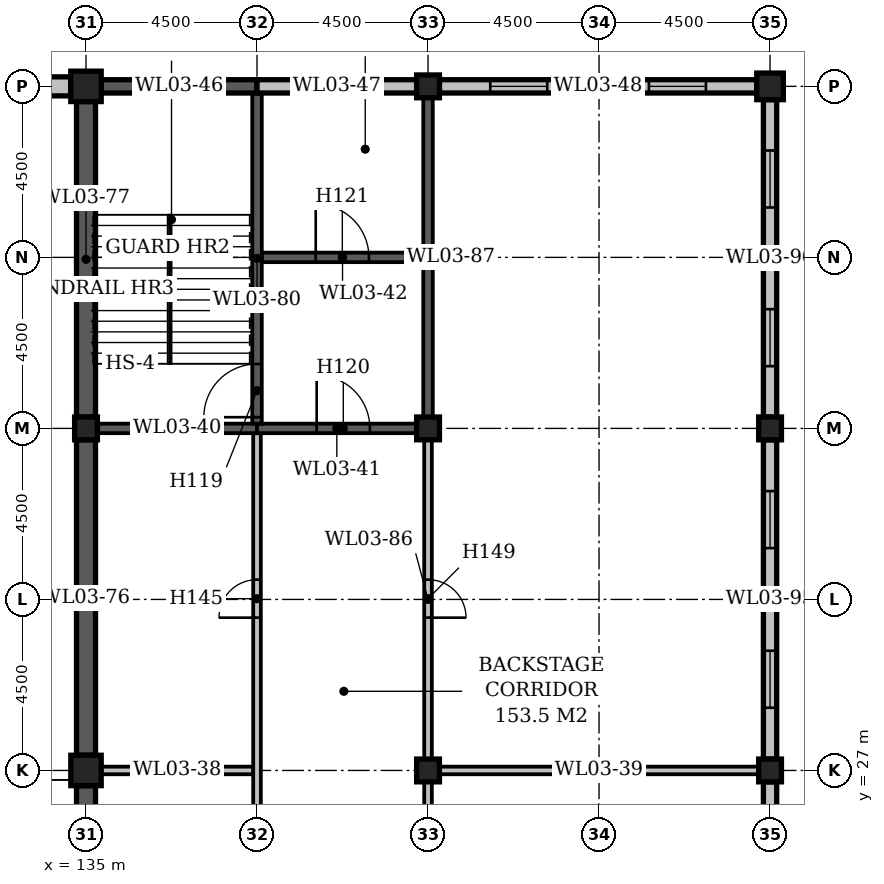
"""IFC4 building model, lengths in metres.
Left out: names, types, materials, properties, quantities, classifications, styles, units other than length and angle.
Written with IfcOpenShell. Run it as: python <this file> out.ifc"""

import sys

from ifc_helpers import new_model, si_unit, direction, frame, frame_2d, origin, origin_2d, place, context, subcontext, project, spatial, rectangle, extrude, element, fill, save


model = new_model("IFC4")
c1 = context("Model", 3, precision=1e-05, world=origin(), true_north=direction((0.0, 1.0)))
c2 = subcontext(c1, "Body", "Model", "MODEL_VIEW")
j1 = project(units=[si_unit("LENGTHUNIT", "METRE"), si_unit("PLANEANGLEUNIT", "RADIAN")], contexts=[c1])
p1 = place(None, origin())
s1 = spatial("IfcSite", under=j1, at=p1, CompositionType="ELEMENT")
p2 = place(p1, origin())
s2 = spatial("IfcBuilding", under=s1, at=p2, CompositionType="ELEMENT")
p3 = place(p2, frame((0.0, 0.0, 19.0)))
s3 = spatial("IfcBuildingStorey", under=s2, at=p3, CompositionType="ELEMENT", Elevation=19.0)
p4 = place(p3, frame((135.0, 27.0, -0.3), z_axis=(0.0, 0.0, 1.0), x_axis=(1.0, 0.0, 0.0)))
e1 = element("IfcColumn", 1, at=p4, inside=s3, PredefinedType="COLUMN", context=c2, shape_type="SweptSolid", body=[
    extrude(rectangle(XDim=0.8, YDim=0.8, at=origin_2d()), origin(), (0.0, 0.0, 1.0), 5.0),
])
p5 = place(p3, frame((135.0, 36.0, -0.3), z_axis=(0.0, 0.0, 1.0), x_axis=(1.0, 0.0, 0.0)))
e2 = element("IfcColumn", 2, at=p5, inside=s3, PredefinedType="COLUMN", context=c2, shape_type="SweptSolid", body=[
    extrude(rectangle(XDim=0.6, YDim=0.6, at=origin_2d()), origin(), (0.0, 0.0, 1.0), 5.0),
])
p6 = place(p3, frame((135.0, 45.0, -0.3), z_axis=(0.0, 0.0, 1.0), x_axis=(1.0, 0.0, 0.0)))
e3 = element("IfcColumn", 3, at=p6, inside=s3, PredefinedType="COLUMN", context=c2, shape_type="SweptSolid", body=[
    extrude(rectangle(XDim=0.8, YDim=0.8, at=origin_2d()), origin(), (0.0, 0.0, 1.0), 5.0),
])
for number, where, z_axis, x_axis in (
    (4, (144.0, 27.0, 0.0), (0.0, 0.0, 1.0), (1.0, 0.0, 0.0)),
    (5, (144.0, 36.0, 0.0), (0.0, 0.0, 1.0), (1.0, 0.0, 0.0)),
    (6, (144.0, 45.0, 0.0), (0.0, 0.0, 1.0), (1.0, 0.0, 0.0)),
    (7, (153.0, 27.0, 0.0), (0.0, 0.0, 1.0), (1.0, 0.0, 0.0)),
    (8, (153.0, 36.0, 0.0), (0.0, 0.0, 1.0), (1.0, 0.0, 0.0)),
):
    element("IfcColumn", number, at=place(p3, frame(where, z_axis=z_axis, x_axis=x_axis)), inside=s3, PredefinedType="COLUMN", context=c2, shape_type="SweptSolid", body=[
        extrude(rectangle(XDim=0.6, YDim=0.6, at=origin_2d()), origin(), (0.0, 0.0, 1.0), 4.7),
    ])
p7 = place(p3, frame((153.0, 45.0, 0.0), z_axis=(0.0, 0.0, 1.0), x_axis=(1.0, 0.0, 0.0)))
e9 = element("IfcColumn", 9, at=p7, inside=s3, PredefinedType="COLUMN", context=c2, shape_type="SweptSolid", body=[
    extrude(rectangle(XDim=0.7, YDim=0.7, at=origin_2d()), origin(), (0.0, 0.0, 1.0), 4.7),
])
p8 = place(p3, frame((135.4, 27.0, 0.0), z_axis=(0.0, 0.0, 1.0), x_axis=(1.0, 0.0, 0.0)))
e10 = element("IfcWall", 10, at=p8, inside=s3, PredefinedType="STANDARD", context=c2, shape_type="SweptSolid", body=[
    extrude(rectangle(XDim=4.0, YDim=0.2, at=frame_2d((2.0, 0.0))), origin(), (0.0, 0.0, 1.0), 4.7),
])
p9 = place(p3, frame((144.3, 27.0, 0.0), z_axis=(0.0, 0.0, 1.0), x_axis=(1.0, 0.0, 0.0)))
e11 = element("IfcWall", 11, at=p9, inside=s3, PredefinedType="STANDARD", context=c2, shape_type="SweptSolid", body=[
    extrude(rectangle(XDim=8.4, YDim=0.2, at=frame_2d((4.2, 0.0))), origin(), (0.0, 0.0, 1.0), 4.7),
])
p10 = place(p3, frame((135.3, 36.0, 0.0), z_axis=(0.0, 0.0, 1.0), x_axis=(1.0, 0.0, 0.0)))
e12 = element("IfcWall", 12, at=p10, inside=s3, PredefinedType="STANDARD", context=c2, shape_type="SweptSolid", body=[
    extrude(rectangle(XDim=4.2, YDim=0.25, at=frame_2d((2.1, 0.0))), origin(), (0.0, 0.0, 1.0), 5.0),
])
p11 = place(p3, frame((139.5, 36.0, 0.0), z_axis=(0.0, 0.0, 1.0), x_axis=(1.0, 0.0, 0.0)))
e13 = element("IfcWall", 13, at=p11, inside=s3, PredefinedType="STANDARD", context=c2, shape_type="SweptSolid", body=[
    extrude(rectangle(XDim=4.2, YDim=0.25, at=frame_2d((2.1, 0.0))), origin(), (0.0, 0.0, 1.0), 4.7),
])
p12 = place(p11, frame((1.57, 0.0, 0.0)))
e14 = element("IfcOpeningElement", 14, at=p12, cuts=e13, PredefinedType="OPENING", context=c2, shape_type="SweptSolid", body=[
    extrude(rectangle(XDim=1.4, YDim=2.1, at=frame_2d((0.7, 1.05))), frame((0.0, 0.137, 0.0), z_axis=(0.0, -1.0, 0.0), x_axis=(1.0, 0.0, 0.0)), (0.0, 0.0, 1.0), 0.274),
])
p13 = place(p3, frame((139.625, 40.5, 0.0), z_axis=(0.0, 0.0, 1.0), x_axis=(1.0, 0.0, 0.0)))
e15 = element("IfcWall", 15, at=p13, inside=s3, PredefinedType="STANDARD", context=c2, shape_type="SweptSolid", body=[
    extrude(rectangle(XDim=4.25, YDim=0.25, at=frame_2d((2.125, 0.0))), origin(), (0.0, 0.0, 1.0), 4.7),
])
p14 = place(p13, frame((1.42, 0.0, 0.0)))
e16 = element("IfcOpeningElement", 16, at=p14, cuts=e15, PredefinedType="OPENING", context=c2, shape_type="SweptSolid", body=[
    extrude(rectangle(XDim=1.4, YDim=2.1, at=frame_2d((0.7, 1.05))), frame((0.0, 0.137, 0.0), z_axis=(0.0, -1.0, 0.0), x_axis=(1.0, 0.0, 0.0)), (0.0, 0.0, 1.0), 0.274),
])
p15 = place(p3, frame((126.3, 45.0, 0.0), z_axis=(0.0, 0.0, 1.0), x_axis=(1.0, 0.0, 0.0)))
e17 = element("IfcWall", 17, at=p15, inside=s3, PredefinedType="STANDARD", context=c2, shape_type="SweptSolid", body=[
    extrude(rectangle(XDim=8.3, YDim=0.5, at=frame_2d((4.15, 0.0))), origin(), (0.0, 0.0, 1.0), 5.0),
])
p16 = place(p3, frame((135.4, 45.0, 0.0), z_axis=(0.0, 0.0, 1.0), x_axis=(1.0, 0.0, 0.0)))
e18 = element("IfcWall", 18, at=p16, inside=s3, PredefinedType="STANDARD", context=c2, shape_type="SweptSolid", body=[
    extrude(rectangle(XDim=4.1, YDim=0.35, at=frame_2d((2.05, 0.0))), origin(), (0.0, 0.0, 1.0), 5.0),
])
p17 = place(p3, frame((139.5, 45.0, 0.0), z_axis=(0.0, 0.0, 1.0), x_axis=(1.0, 0.0, 0.0)))
e19 = element("IfcWall", 19, at=p17, inside=s3, PredefinedType="STANDARD", context=c2, shape_type="SweptSolid", body=[
    extrude(rectangle(XDim=4.2, YDim=0.35, at=frame_2d((2.1, 0.0))), origin(), (0.0, 0.0, 1.0), 4.1),
])
p18 = place(p3, frame((144.3, 45.0, 0.0), z_axis=(0.0, 0.0, 1.0), x_axis=(1.0, 0.0, 0.0)))
e20 = element("IfcWall", 20, at=p18, inside=s3, PredefinedType="STANDARD", context=c2, shape_type="SweptSolid", body=[
    extrude(rectangle(XDim=8.35, YDim=0.35, at=frame_2d((4.175, 0.0))), origin(), (0.0, 0.0, 1.0), 4.1),
])
p19 = place(p18, frame((1.337, 0.0, 1.0)))
e21 = element("IfcOpeningElement", 21, at=p19, cuts=e20, PredefinedType="OPENING", context=c2, shape_type="SweptSolid", body=[
    extrude(rectangle(XDim=1.5, YDim=2.4, at=frame_2d((0.75, 1.2))), frame((0.0, 0.187, 0.0), z_axis=(0.0, -1.0, 0.0), x_axis=(1.0, 0.0, 0.0)), (0.0, 0.0, 1.0), 0.374),
])
p20 = place(p18, frame((5.512, 0.0, 1.0)))
e22 = element("IfcOpeningElement", 22, at=p20, cuts=e20, PredefinedType="OPENING", context=c2, shape_type="SweptSolid", body=[
    extrude(rectangle(XDim=1.5, YDim=2.4, at=frame_2d((0.75, 1.2))), frame((0.0, 0.187, 0.0), z_axis=(0.0, -1.0, 0.0), x_axis=(1.0, 0.0, 0.0)), (0.0, 0.0, 1.0), 0.374),
])
p21 = place(p3, frame((135.0, 18.4, 0.0), z_axis=(0.0, 0.0, 1.0), x_axis=(0.0, 1.0, 0.0)))
e23 = element("IfcWall", 23, at=p21, inside=s3, PredefinedType="STANDARD", context=c2, shape_type="SweptSolid", body=[
    extrude(rectangle(XDim=8.2, YDim=0.5, at=frame_2d((4.1, 0.0))), origin(), (0.0, 0.0, 1.0), 5.0),
])
for number, where, z_axis, x_axis in (
    (24, (135.0, 27.4, 0.0), (0.0, 0.0, 1.0), (0.0, 1.0, 0.0)),
    (25, (135.0, 36.3, 0.0), (0.0, 0.0, 1.0), (0.0, 1.0, 0.0)),
):
    element("IfcWall", number, at=place(p3, frame(where, z_axis=z_axis, x_axis=x_axis)), inside=s3, PredefinedType="STANDARD", context=c2, shape_type="SweptSolid", body=[
        extrude(rectangle(XDim=8.3, YDim=0.5, at=frame_2d((4.15, 0.0))), origin(), (0.0, 0.0, 1.0), 5.0),
    ])
p22 = place(p3, frame((139.5, 0.1, 0.0), z_axis=(0.0, 0.0, 1.0), x_axis=(0.0, 1.0, 0.0)))
e26 = element("IfcWall", 26, at=p22, inside=s3, PredefinedType="STANDARD", context=c2, shape_type="SweptSolid", body=[
    extrude(rectangle(XDim=35.775, YDim=0.2, at=frame_2d((17.887, 0.0))), origin(), (0.0, 0.0, 1.0), 4.7),
])
p23 = place(p22, frame((6.17, 0.0, 0.0)))
e27 = element("IfcOpeningElement", 27, at=p23, cuts=e26, PredefinedType="OPENING", context=c2, shape_type="SweptSolid", body=[
    extrude(rectangle(XDim=1.0, YDim=2.1, at=frame_2d((0.5, 1.05))), frame((0.0, 0.112, 0.0), z_axis=(0.0, -1.0, 0.0), x_axis=(1.0, 0.0, 0.0)), (0.0, 0.0, 1.0), 0.224),
])
p24 = place(p22, frame((10.67, 0.0, 0.0)))
e28 = element("IfcOpeningElement", 28, at=p24, cuts=e26, PredefinedType="OPENING", context=c2, shape_type="SweptSolid", body=[
    extrude(rectangle(XDim=1.0, YDim=2.1, at=frame_2d((0.5, 1.05))), frame((0.0, 0.112, 0.0), z_axis=(0.0, -1.0, 0.0), x_axis=(1.0, 0.0, 0.0)), (0.0, 0.0, 1.0), 0.224),
])
p25 = place(p22, frame((15.17, 0.0, 0.0)))
e29 = element("IfcOpeningElement", 29, at=p25, cuts=e26, PredefinedType="OPENING", context=c2, shape_type="SweptSolid", body=[
    extrude(rectangle(XDim=1.0, YDim=2.1, at=frame_2d((0.5, 1.05))), frame((0.0, 0.112, 0.0), z_axis=(0.0, -1.0, 0.0), x_axis=(1.0, 0.0, 0.0)), (0.0, 0.0, 1.0), 0.224),
])
p26 = place(p22, frame((19.67, 0.0, 0.0)))
e30 = element("IfcOpeningElement", 30, at=p26, cuts=e26, PredefinedType="OPENING", context=c2, shape_type="SweptSolid", body=[
    extrude(rectangle(XDim=1.0, YDim=2.1, at=frame_2d((0.5, 1.05))), frame((0.0, 0.112, 0.0), z_axis=(0.0, -1.0, 0.0), x_axis=(1.0, 0.0, 0.0)), (0.0, 0.0, 1.0), 0.224),
])
p27 = place(p22, frame((24.17, 0.0, 0.0)))
e31 = element("IfcOpeningElement", 31, at=p27, cuts=e26, PredefinedType="OPENING", context=c2, shape_type="SweptSolid", body=[
    extrude(rectangle(XDim=1.0, YDim=2.1, at=frame_2d((0.5, 1.05))), frame((0.0, 0.112, 0.0), z_axis=(0.0, -1.0, 0.0), x_axis=(1.0, 0.0, 0.0)), (0.0, 0.0, 1.0), 0.224),
])
p28 = place(p22, frame((30.92, 0.0, 0.0)))
e32 = element("IfcOpeningElement", 32, at=p28, cuts=e26, PredefinedType="OPENING", context=c2, shape_type="SweptSolid", body=[
    extrude(rectangle(XDim=1.0, YDim=2.1, at=frame_2d((0.5, 1.05))), frame((0.0, 0.112, 0.0), z_axis=(0.0, -1.0, 0.0), x_axis=(1.0, 0.0, 0.0)), (0.0, 0.0, 1.0), 0.224),
])
p29 = place(p3, frame((139.5, 36.125, 0.0), z_axis=(0.0, 0.0, 1.0), x_axis=(0.0, 1.0, 0.0)))
e33 = element("IfcWall", 33, at=p29, inside=s3, PredefinedType="STANDARD", context=c2, shape_type="SweptSolid", body=[
    extrude(rectangle(XDim=8.7, YDim=0.25, at=frame_2d((4.35, 0.0))), origin(), (0.0, 0.0, 1.0), 5.0),
])
p30 = place(p29, frame((0.17, 0.0, 0.0)))
e34 = element("IfcOpeningElement", 34, at=p30, cuts=e33, PredefinedType="OPENING", context=c2, shape_type="SweptSolid", body=[
    extrude(rectangle(XDim=1.4, YDim=2.1, at=frame_2d((0.7, 1.05))), frame((0.0, 0.137, 0.0), z_axis=(0.0, -1.0, 0.0), x_axis=(1.0, 0.0, 0.0)), (0.0, 0.0, 1.0), 0.274),
])
p31 = place(p3, frame((144.0, 18.3, 0.0), z_axis=(0.0, 0.0, 1.0), x_axis=(0.0, 1.0, 0.0)))
e35 = element("IfcWall", 35, at=p31, inside=s3, PredefinedType="STANDARD", context=c2, shape_type="SweptSolid", body=[
    extrude(rectangle(XDim=8.4, YDim=0.2, at=frame_2d((4.2, 0.0))), origin(), (0.0, 0.0, 1.0), 4.7),
])
p32 = place(p31, frame((2.97, 0.0, 0.0)))
e36 = element("IfcOpeningElement", 36, at=p32, cuts=e35, PredefinedType="OPENING", context=c2, shape_type="SweptSolid", body=[
    extrude(rectangle(XDim=1.0, YDim=2.1, at=frame_2d((0.5, 1.05))), frame((0.0, 0.112, 0.0), z_axis=(0.0, -1.0, 0.0), x_axis=(1.0, 0.0, 0.0)), (0.0, 0.0, 1.0), 0.224),
])
p33 = place(p3, frame((144.0, 27.3, 0.0), z_axis=(0.0, 0.0, 1.0), x_axis=(0.0, 1.0, 0.0)))
e37 = element("IfcWall", 37, at=p33, inside=s3, PredefinedType="STANDARD", context=c2, shape_type="SweptSolid", body=[
    extrude(rectangle(XDim=8.4, YDim=0.2, at=frame_2d((4.2, 0.0))), origin(), (0.0, 0.0, 1.0), 4.7),
])
p34 = place(p33, frame((3.72, 0.0, 0.0)))
e38 = element("IfcOpeningElement", 38, at=p34, cuts=e37, PredefinedType="OPENING", context=c2, shape_type="SweptSolid", body=[
    extrude(rectangle(XDim=1.0, YDim=2.1, at=frame_2d((0.5, 1.05))), frame((0.0, 0.112, 0.0), z_axis=(0.0, -1.0, 0.0), x_axis=(1.0, 0.0, 0.0)), (0.0, 0.0, 1.0), 0.224),
])
p35 = place(p3, frame((144.0, 36.3, 0.0), z_axis=(0.0, 0.0, 1.0), x_axis=(0.0, 1.0, 0.0)))
e39 = element("IfcWall", 39, at=p35, inside=s3, PredefinedType="STANDARD", context=c2, shape_type="SweptSolid", body=[
    extrude(rectangle(XDim=8.4, YDim=0.25, at=frame_2d((4.2, 0.0))), origin(), (0.0, 0.0, 1.0), 4.7),
])
p36 = place(p3, frame((153.0, 18.3, 0.0), z_axis=(0.0, 0.0, 1.0), x_axis=(0.0, 1.0, 0.0)))
e40 = element("IfcWall", 40, at=p36, inside=s3, PredefinedType="STANDARD", context=c2, shape_type="SweptSolid", body=[
    extrude(rectangle(XDim=8.4, YDim=0.35, at=frame_2d((4.2, 0.0))), origin(), (0.0, 0.0, 1.0), 4.1),
])
p37 = place(p36, frame((1.35, 0.0, 1.0)))
e41 = element("IfcOpeningElement", 41, at=p37, cuts=e40, PredefinedType="OPENING", context=c2, shape_type="SweptSolid", body=[
    extrude(rectangle(XDim=1.5, YDim=2.4, at=frame_2d((0.75, 1.2))), frame((0.0, 0.187, 0.0), z_axis=(0.0, -1.0, 0.0), x_axis=(1.0, 0.0, 0.0)), (0.0, 0.0, 1.0), 0.374),
])
p38 = place(p36, frame((5.55, 0.0, 1.0)))
e42 = element("IfcOpeningElement", 42, at=p38, cuts=e40, PredefinedType="OPENING", context=c2, shape_type="SweptSolid", body=[
    extrude(rectangle(XDim=1.5, YDim=2.4, at=frame_2d((0.75, 1.2))), frame((0.0, 0.187, 0.0), z_axis=(0.0, -1.0, 0.0), x_axis=(1.0, 0.0, 0.0)), (0.0, 0.0, 1.0), 0.374),
])
p39 = place(p3, frame((153.0, 27.3, 0.0), z_axis=(0.0, 0.0, 1.0), x_axis=(0.0, 1.0, 0.0)))
e43 = element("IfcWall", 43, at=p39, inside=s3, PredefinedType="STANDARD", context=c2, shape_type="SweptSolid", body=[
    extrude(rectangle(XDim=8.4, YDim=0.35, at=frame_2d((4.2, 0.0))), origin(), (0.0, 0.0, 1.0), 4.1),
])
p40 = place(p39, frame((1.35, 0.0, 1.0)))
e44 = element("IfcOpeningElement", 44, at=p40, cuts=e43, PredefinedType="OPENING", context=c2, shape_type="SweptSolid", body=[
    extrude(rectangle(XDim=1.5, YDim=2.4, at=frame_2d((0.75, 1.2))), frame((0.0, 0.187, 0.0), z_axis=(0.0, -1.0, 0.0), x_axis=(1.0, 0.0, 0.0)), (0.0, 0.0, 1.0), 0.374),
])
p41 = place(p39, frame((5.55, 0.0, 1.0)))
e45 = element("IfcOpeningElement", 45, at=p41, cuts=e43, PredefinedType="OPENING", context=c2, shape_type="SweptSolid", body=[
    extrude(rectangle(XDim=1.5, YDim=2.4, at=frame_2d((0.75, 1.2))), frame((0.0, 0.187, 0.0), z_axis=(0.0, -1.0, 0.0), x_axis=(1.0, 0.0, 0.0)), (0.0, 0.0, 1.0), 0.374),
])
p42 = place(p3, frame((153.0, 36.3, 0.0), z_axis=(0.0, 0.0, 1.0), x_axis=(0.0, 1.0, 0.0)))
e46 = element("IfcWall", 46, at=p42, inside=s3, PredefinedType="STANDARD", context=c2, shape_type="SweptSolid", body=[
    extrude(rectangle(XDim=8.35, YDim=0.35, at=frame_2d((4.175, 0.0))), origin(), (0.0, 0.0, 1.0), 4.1),
])
p43 = place(p42, frame((1.337, 0.0, 1.0)))
e47 = element("IfcOpeningElement", 47, at=p43, cuts=e46, PredefinedType="OPENING", context=c2, shape_type="SweptSolid", body=[
    extrude(rectangle(XDim=1.5, YDim=2.4, at=frame_2d((0.75, 1.2))), frame((0.0, 0.187, 0.0), z_axis=(0.0, -1.0, 0.0), x_axis=(1.0, 0.0, 0.0)), (0.0, 0.0, 1.0), 0.374),
])
p44 = place(p42, frame((5.512, 0.0, 1.0)))
e48 = element("IfcOpeningElement", 48, at=p44, cuts=e46, PredefinedType="OPENING", context=c2, shape_type="SweptSolid", body=[
    extrude(rectangle(XDim=1.5, YDim=2.4, at=frame_2d((0.75, 1.2))), frame((0.0, 0.187, 0.0), z_axis=(0.0, -1.0, 0.0), x_axis=(1.0, 0.0, 0.0)), (0.0, 0.0, 1.0), 0.374),
])
p45 = place(p30, origin())
e49 = element("IfcDoor", 49, at=p45, inside=s3, OperationType="DOUBLE_DOOR_SINGLE_SWING", PredefinedType="DOOR", context=c2, shape_type="SweptSolid", body=[
    extrude(rectangle(XDim=1.4, YDim=2.1, at=frame_2d((0.7, 1.05))), frame((0.0, 0.025, 0.0), z_axis=(0.0, -1.0, 0.0), x_axis=(1.0, 0.0, 0.0)), (0.0, 0.0, 1.0), 0.05),
])
fill(e34, e49)
p46 = place(p12, origin())
e50 = element("IfcDoor", 50, at=p46, inside=s3, OperationType="DOUBLE_DOOR_SINGLE_SWING", PredefinedType="DOOR", context=c2, shape_type="SweptSolid", body=[
    extrude(rectangle(XDim=1.4, YDim=2.1, at=frame_2d((0.7, 1.05))), frame((0.0, 0.025, 0.0), z_axis=(0.0, -1.0, 0.0), x_axis=(1.0, 0.0, 0.0)), (0.0, 0.0, 1.0), 0.05),
])
fill(e14, e50)
p47 = place(p14, origin())
e51 = element("IfcDoor", 51, at=p47, inside=s3, OperationType="DOUBLE_DOOR_SINGLE_SWING", PredefinedType="DOOR", context=c2, shape_type="SweptSolid", body=[
    extrude(rectangle(XDim=1.4, YDim=2.1, at=frame_2d((0.7, 1.05))), frame((0.0, 0.025, 0.0), z_axis=(0.0, -1.0, 0.0), x_axis=(1.0, 0.0, 0.0)), (0.0, 0.0, 1.0), 0.05),
])
fill(e16, e51)
p48 = place(p28, origin())
e52 = element("IfcDoor", 52, at=p48, inside=s3, OperationType="SINGLE_SWING_LEFT", PredefinedType="DOOR", context=c2, shape_type="SweptSolid", body=[
    extrude(rectangle(XDim=1.0, YDim=2.1, at=frame_2d((0.5, 1.05))), frame((0.0, 0.025, 0.0), z_axis=(0.0, -1.0, 0.0), x_axis=(1.0, 0.0, 0.0)), (0.0, 0.0, 1.0), 0.05),
])
fill(e32, e52)
p49 = place(p34, frame((1.0, 0.0, 0.0), z_axis=(0.0, 0.0, 1.0), x_axis=(-1.0, 0.0, 0.0)))
e53 = element("IfcDoor", 53, at=p49, inside=s3, OperationType="SINGLE_SWING_RIGHT", PredefinedType="DOOR", context=c2, shape_type="SweptSolid", body=[
    extrude(rectangle(XDim=1.0, YDim=2.1, at=frame_2d((0.5, 1.05))), frame((0.0, 0.025, 0.0), z_axis=(0.0, -1.0, 0.0), x_axis=(1.0, 0.0, 0.0)), (0.0, 0.0, 1.0), 0.05),
])
fill(e38, e53)
p50 = place(p19, origin())
e54 = element("IfcWindow", 54, at=p50, inside=s3, PartitioningType="SINGLE_PANEL", PredefinedType="WINDOW", context=c2, shape_type="SweptSolid", body=[
    extrude(rectangle(XDim=1.5, YDim=2.4, at=frame_2d((0.75, 1.2))), frame((0.0, 0.03, 0.0), z_axis=(0.0, -1.0, 0.0), x_axis=(1.0, 0.0, 0.0)), (0.0, 0.0, 1.0), 0.06),
])
fill(e21, e54)
p51 = place(p20, origin())
e55 = element("IfcWindow", 55, at=p51, inside=s3, PartitioningType="SINGLE_PANEL", PredefinedType="WINDOW", context=c2, shape_type="SweptSolid", body=[
    extrude(rectangle(XDim=1.5, YDim=2.4, at=frame_2d((0.75, 1.2))), frame((0.0, 0.03, 0.0), z_axis=(0.0, -1.0, 0.0), x_axis=(1.0, 0.0, 0.0)), (0.0, 0.0, 1.0), 0.06),
])
fill(e22, e55)
p52 = place(p40, origin())
e56 = element("IfcWindow", 56, at=p52, inside=s3, PartitioningType="SINGLE_PANEL", PredefinedType="WINDOW", context=c2, shape_type="SweptSolid", body=[
    extrude(rectangle(XDim=1.5, YDim=2.4, at=frame_2d((0.75, 1.2))), frame((0.0, 0.03, 0.0), z_axis=(0.0, -1.0, 0.0), x_axis=(1.0, 0.0, 0.0)), (0.0, 0.0, 1.0), 0.06),
])
fill(e44, e56)
p53 = place(p41, origin())
e57 = element("IfcWindow", 57, at=p53, inside=s3, PartitioningType="SINGLE_PANEL", PredefinedType="WINDOW", context=c2, shape_type="SweptSolid", body=[
    extrude(rectangle(XDim=1.5, YDim=2.4, at=frame_2d((0.75, 1.2))), frame((0.0, 0.03, 0.0), z_axis=(0.0, -1.0, 0.0), x_axis=(1.0, 0.0, 0.0)), (0.0, 0.0, 1.0), 0.06),
])
fill(e45, e57)
p54 = place(p43, origin())
e58 = element("IfcWindow", 58, at=p54, inside=s3, PartitioningType="SINGLE_PANEL", PredefinedType="WINDOW", context=c2, shape_type="SweptSolid", body=[
    extrude(rectangle(XDim=1.5, YDim=2.4, at=frame_2d((0.75, 1.2))), frame((0.0, 0.03, 0.0), z_axis=(0.0, -1.0, 0.0), x_axis=(1.0, 0.0, 0.0)), (0.0, 0.0, 1.0), 0.06),
])
fill(e47, e58)
p55 = place(p44, origin())
e59 = element("IfcWindow", 59, at=p55, inside=s3, PartitioningType="SINGLE_PANEL", PredefinedType="WINDOW", context=c2, shape_type="SweptSolid", body=[
    extrude(rectangle(XDim=1.5, YDim=2.4, at=frame_2d((0.75, 1.2))), frame((0.0, 0.03, 0.0), z_axis=(0.0, -1.0, 0.0), x_axis=(1.0, 0.0, 0.0)), (0.0, 0.0, 1.0), 0.06),
])
fill(e48, e59)
save(model, sys.argv[1])
